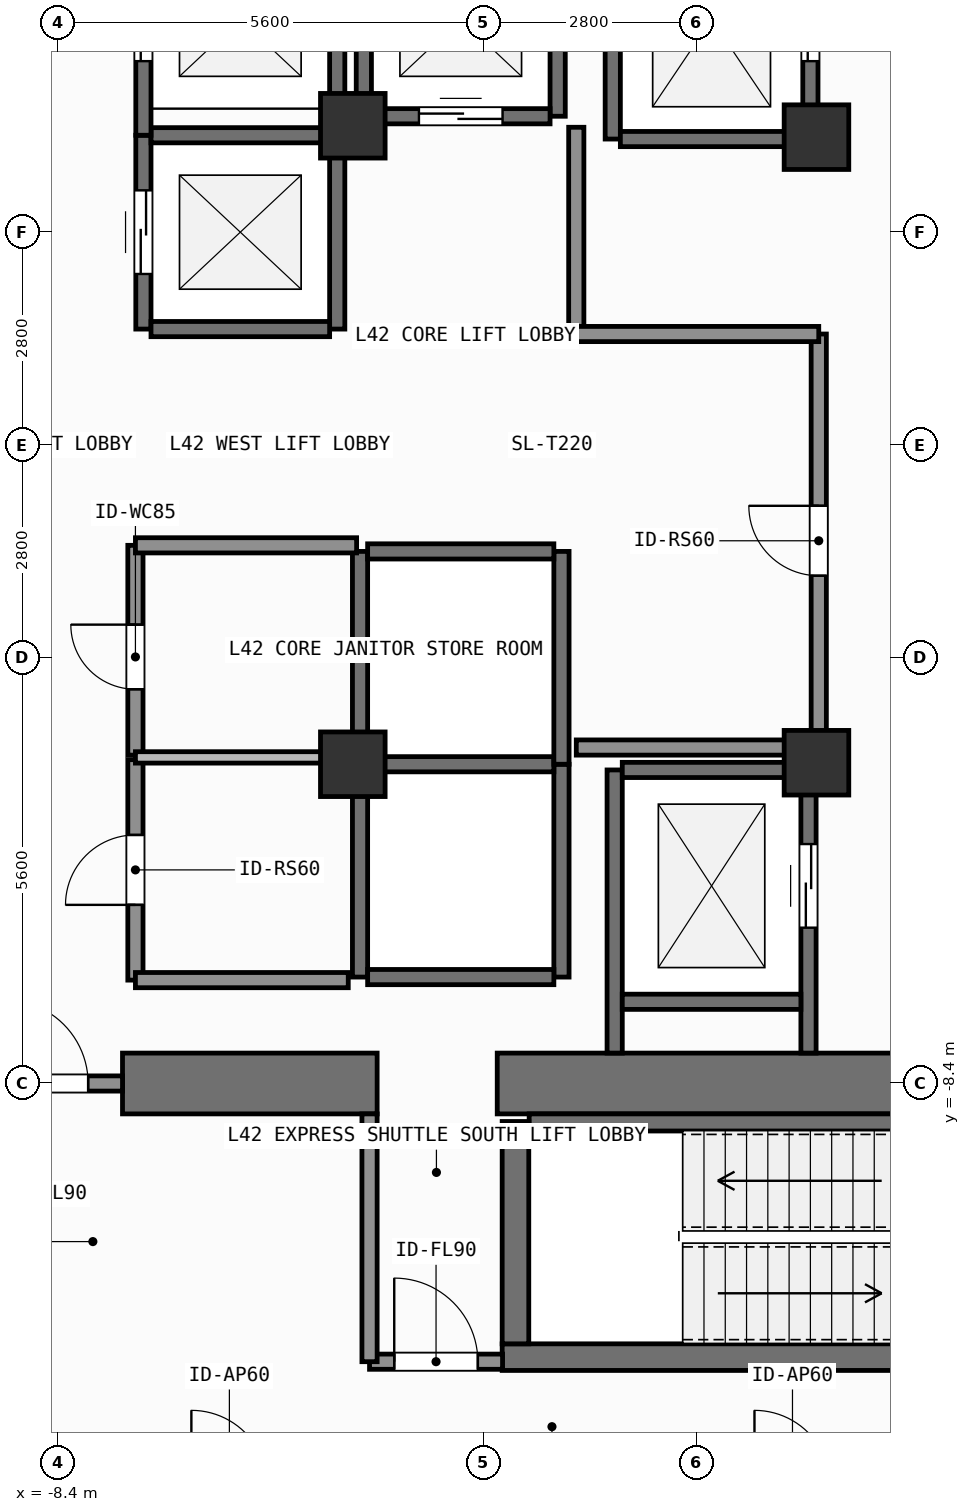
"""IFC4 building model, lengths in metres.
Left out: names, types, materials, properties, quantities, classifications, styles, units other than length and angle.
Written with IfcOpenShell. Run it as: python <this file> out.ifc"""

import sys

from ifc_helpers import new_model, si_unit, direction, frame, frame_2d, origin, origin_2d, place, context, subcontext, project, spatial, rectangle, extrude, element, fill, save


model = new_model("IFC4")
c1 = context("Model", 3, precision=1e-05, world=origin(), true_north=direction((0.0, 1.0)))
c2 = subcontext(c1, "Body", "Model", "MODEL_VIEW")
j1 = project(units=[si_unit("LENGTHUNIT", "METRE"), si_unit("PLANEANGLEUNIT", "RADIAN")], contexts=[c1])
p1 = place(None, origin())
s1 = spatial("IfcSite", under=j1, at=p1, CompositionType="ELEMENT")
p2 = place(p1, origin())
s2 = spatial("IfcBuilding", under=s1, at=p2, CompositionType="ELEMENT")
p3 = place(p2, frame((0.0, 0.0, 171.9)))
s3 = spatial("IfcBuildingStorey", under=s2, at=p3, CompositionType="ELEMENT", Elevation=171.9)
p4 = place(p3, frame((-7.55, -8.4, 0.0), z_axis=(0.0, 0.0, 1.0), x_axis=(1.0, 0.0, 0.0)))
e1 = element("IfcWall", 1, at=p4, inside=s3, PredefinedType="SHEAR", context=c2, shape_type="SweptSolid", body=[
    extrude(rectangle(XDim=3.35, YDim=0.8, at=frame_2d((1.675, 0.0))), origin(), (0.0, 0.0, 1.0), 3.9),
])
p5 = place(p3, frame((-2.62, -8.4, 0.0), z_axis=(0.0, 0.0, 1.0), x_axis=(1.0, 0.0, 0.0)))
e2 = element("IfcWall", 2, at=p5, inside=s3, PredefinedType="SHEAR", context=c2, shape_type="SweptSolid", body=[
    extrude(rectangle(XDim=7.27, YDim=0.8, at=frame_2d((3.635, 0.0))), origin(), (0.0, 0.0, 1.0), 3.9),
])
p6 = place(p3, frame((-2.555, -12.0, 0.0), z_axis=(0.0, 0.0, 1.0), x_axis=(1.0, 0.0, 0.0)))
e3 = element("IfcWall", 3, at=p6, inside=s3, PredefinedType="SHEAR", context=c2, shape_type="SweptSolid", body=[
    extrude(rectangle(XDim=7.31, YDim=0.35, at=frame_2d((3.655, 0.0))), origin(), (0.0, 0.0, 1.0), 3.9),
])
p7 = place(p3, frame((-2.2, -8.913, 0.0), z_axis=(0.0, 0.0, 1.0), x_axis=(1.0, 0.0, 0.0)))
e4 = element("IfcWall", 4, at=p7, inside=s3, PredefinedType="SHEAR", context=c2, shape_type="SweptSolid", body=[
    extrude(rectangle(XDim=6.6, YDim=0.225, at=frame_2d((3.3, 0.0))), origin(), (0.0, 0.0, 1.0), 3.9),
])
p8 = place(p3, frame((-2.38, -11.825, 0.0), z_axis=(0.0, 0.0, 1.0), x_axis=(0.0, 1.0, 0.0)))
e5 = element("IfcWall", 5, at=p8, inside=s3, PredefinedType="SHEAR", context=c2, shape_type="SweptSolid", body=[
    extrude(rectangle(XDim=2.925, YDim=0.35, at=frame_2d((1.462, 0.0))), origin(), (0.0, 0.0, 1.0), 3.9),
])
for number, where, z_axis, x_axis in (
    (6, (-4.52, -4.2, 0.0), (0.0, 0.0, 1.0), (1.0, 0.0, 0.0)),
    (7, (1.58, -4.18, 0.0), (0.0, 0.0, 1.0), (1.0, 0.0, 0.0)),
    (8, (1.58, 4.05, 0.0), (0.0, 0.0, 1.0), (1.0, 0.0, 0.0)),
    (9, (-4.52, 4.2, 0.0), (0.0, 0.0, 1.0), (1.0, 0.0, 0.0)),
):
    element("IfcColumn", number, at=place(p3, frame(where, z_axis=z_axis, x_axis=x_axis)), inside=s3, PredefinedType="COLUMN", context=c2, shape_type="SweptSolid", body=[
        extrude(rectangle(XDim=0.85, YDim=0.85, at=origin_2d()), origin(), (0.0, 0.0, 1.0), 3.9),
    ])
p9 = place(p3, frame((-7.275, 1.525, 0.0), z_axis=(0.0, 0.0, 1.0), x_axis=(0.0, 1.0, 0.0)))
e10 = element("IfcWall", 10, at=p9, inside=s3, PredefinedType="SHEAR", context=c2, shape_type="SweptSolid", body=[
    extrude(rectangle(XDim=2.55, YDim=0.2, at=frame_2d((1.275, 0.0))), origin(), (0.0, 0.0, 1.0), 3.68),
])
p10 = place(p9, frame((0.725, 0.0, 0.0)))
e11 = element("IfcOpeningElement", 11, at=p10, cuts=e10, PredefinedType="OPENING", context=c2, shape_type="SweptSolid", body=[
    extrude(rectangle(XDim=1.1, YDim=2.2, at=frame_2d((0.55, 1.1))), frame((0.0, 0.11, 0.0), z_axis=(0.0, -1.0, 0.0), x_axis=(1.0, 0.0, 0.0)), (0.0, 0.0, 1.0), 0.22),
])
p11 = place(p3, frame((-4.725, 1.525, 0.0), z_axis=(0.0, 0.0, 1.0), x_axis=(0.0, 1.0, 0.0)))
e12 = element("IfcWall", 12, at=p11, inside=s3, PredefinedType="SHEAR", context=c2, shape_type="SweptSolid", body=[
    extrude(rectangle(XDim=2.55, YDim=0.2, at=frame_2d((1.275, 0.0))), origin(), (0.0, 0.0, 1.0), 3.68),
])
for number, where, z_axis, x_axis in (
    (13, (-7.175, 1.525, 0.0), (0.0, 0.0, 1.0), (1.0, 0.0, 0.0)),
    (14, (-7.175, 4.075, 0.0), (0.0, 0.0, 1.0), (1.0, 0.0, 0.0)),
):
    element("IfcWall", number, at=place(p3, frame(where, z_axis=z_axis, x_axis=x_axis)), inside=s3, PredefinedType="SHEAR", context=c2, shape_type="SweptSolid", body=[
        extrude(rectangle(XDim=2.35, YDim=0.2, at=frame_2d((1.175, 0.0))), origin(), (0.0, 0.0, 1.0), 3.68),
    ])
p12 = place(p3, frame((-7.275, 4.075, 0.0), z_axis=(0.0, 0.0, 1.0), x_axis=(0.0, 1.0, 0.0)))
e15 = element("IfcWall", 15, at=p12, inside=s3, PredefinedType="SHEAR", context=c2, shape_type="SweptSolid", body=[
    extrude(rectangle(XDim=2.8, YDim=0.2, at=frame_2d((1.4, 0.0))), origin(), (0.0, 0.0, 1.0), 3.68),
])
p13 = place(p12, frame((0.975, 0.0, 0.0)))
e16 = element("IfcOpeningElement", 16, at=p13, cuts=e15, PredefinedType="OPENING", context=c2, shape_type="SweptSolid", body=[
    extrude(rectangle(XDim=1.1, YDim=2.2, at=frame_2d((0.55, 1.1))), frame((0.0, 0.11, 0.0), z_axis=(0.0, -1.0, 0.0), x_axis=(1.0, 0.0, 0.0)), (0.0, 0.0, 1.0), 0.22),
])
p14 = place(p3, frame((-4.725, 4.075, 0.0), z_axis=(0.0, 0.0, 1.0), x_axis=(0.0, 1.0, 0.0)))
e17 = element("IfcWall", 17, at=p14, inside=s3, PredefinedType="SHEAR", context=c2, shape_type="SweptSolid", body=[
    extrude(rectangle(XDim=2.8, YDim=0.2, at=frame_2d((1.4, 0.0))), origin(), (0.0, 0.0, 1.0), 3.68),
])
for number, where, z_axis, x_axis in (
    (18, (-4.375, 4.325, 0.0), (0.0, 0.0, 1.0), (0.0, 1.0, 0.0)),
    (19, (-1.825, 4.325, 0.0), (0.0, 0.0, 1.0), (0.0, 1.0, 0.0)),
):
    element("IfcWall", number, at=place(p3, frame(where, z_axis=z_axis, x_axis=x_axis)), inside=s3, PredefinedType="SHEAR", context=c2, shape_type="SweptSolid", body=[
        extrude(rectangle(XDim=2.55, YDim=0.2, at=frame_2d((1.275, 0.0))), origin(), (0.0, 0.0, 1.0), 3.68),
    ])
p15 = place(p3, frame((-4.275, 4.325, 0.0), z_axis=(0.0, 0.0, 1.0), x_axis=(1.0, 0.0, 0.0)))
e20 = element("IfcWall", 20, at=p15, inside=s3, PredefinedType="SHEAR", context=c2, shape_type="SweptSolid", body=[
    extrude(rectangle(XDim=2.35, YDim=0.2, at=frame_2d((1.175, 0.0))), origin(), (0.0, 0.0, 1.0), 3.68),
])
p16 = place(p15, frame((0.625, 0.0, 0.0)))
e21 = element("IfcOpeningElement", 21, at=p16, cuts=e20, PredefinedType="OPENING", context=c2, shape_type="SweptSolid", body=[
    extrude(rectangle(XDim=1.1, YDim=2.2, at=frame_2d((0.55, 1.1))), frame((0.0, 0.11, 0.0), z_axis=(0.0, -1.0, 0.0), x_axis=(1.0, 0.0, 0.0)), (0.0, 0.0, 1.0), 0.22),
])
for number, where, z_axis, x_axis in (
    (22, (-4.425, -7.0, 0.0), (0.0, 0.0, 1.0), (0.0, 1.0, 0.0)),
    (23, (-1.775, -7.0, 0.0), (0.0, 0.0, 1.0), (0.0, 1.0, 0.0)),
):
    element("IfcWall", number, at=place(p3, frame(where, z_axis=z_axis, x_axis=x_axis)), inside=s3, PredefinedType="SHEAR", context=c2, shape_type="SweptSolid", body=[
        extrude(rectangle(XDim=2.8, YDim=0.2, at=frame_2d((1.4, 0.0))), origin(), (0.0, 0.0, 1.0), 3.68),
    ])
for number, where, z_axis, x_axis in (
    (24, (-4.325, -7.0, 0.0), (0.0, 0.0, 1.0), (1.0, 0.0, 0.0)),
    (25, (-4.325, -4.2, 0.0), (0.0, 0.0, 1.0), (1.0, 0.0, 0.0)),
):
    element("IfcWall", number, at=place(p3, frame(where, z_axis=z_axis, x_axis=x_axis)), inside=s3, PredefinedType="SHEAR", context=c2, shape_type="SweptSolid", body=[
        extrude(rectangle(XDim=2.45, YDim=0.2, at=frame_2d((1.225, 0.0))), origin(), (0.0, 0.0, 1.0), 3.68),
    ])
for number, where, z_axis, x_axis in (
    (26, (-4.425, -4.2, 0.0), (0.0, 0.0, 1.0), (0.0, 1.0, 0.0)),
    (27, (-1.775, -4.2, 0.0), (0.0, 0.0, 1.0), (0.0, 1.0, 0.0)),
):
    element("IfcWall", number, at=place(p3, frame(where, z_axis=z_axis, x_axis=x_axis)), inside=s3, PredefinedType="SHEAR", context=c2, shape_type="SweptSolid", body=[
        extrude(rectangle(XDim=2.8, YDim=0.2, at=frame_2d((1.4, 0.0))), origin(), (0.0, 0.0, 1.0), 3.68),
    ])
p17 = place(p3, frame((-4.325, -1.4, 0.0), z_axis=(0.0, 0.0, 1.0), x_axis=(1.0, 0.0, 0.0)))
e28 = element("IfcWall", 28, at=p17, inside=s3, PredefinedType="SHEAR", context=c2, shape_type="SweptSolid", body=[
    extrude(rectangle(XDim=2.45, YDim=0.2, at=frame_2d((1.225, 0.0))), origin(), (0.0, 0.0, 1.0), 3.68),
])
p18 = place(p3, frame((-1.1, 4.025, 0.0), z_axis=(0.0, 0.0, 1.0), x_axis=(0.0, 1.0, 0.0)))
e29 = element("IfcWall", 29, at=p18, inside=s3, PredefinedType="SHEAR", context=c2, shape_type="SweptSolid", body=[
    extrude(rectangle(XDim=3.15, YDim=0.2, at=frame_2d((1.575, 0.0))), origin(), (0.0, 0.0, 1.0), 3.68),
])
p19 = place(p3, frame((1.5, 4.025, 0.0), z_axis=(0.0, 0.0, 1.0), x_axis=(0.0, 1.0, 0.0)))
e30 = element("IfcWall", 30, at=p19, inside=s3, PredefinedType="SHEAR", context=c2, shape_type="SweptSolid", body=[
    extrude(rectangle(XDim=3.15, YDim=0.2, at=frame_2d((1.575, 0.0))), origin(), (0.0, 0.0, 1.0), 3.68),
])
p20 = place(p19, frame((1.025, 0.0, 0.0)))
e31 = element("IfcOpeningElement", 31, at=p20, cuts=e30, PredefinedType="OPENING", context=c2, shape_type="SweptSolid", body=[
    extrude(rectangle(XDim=1.1, YDim=2.2, at=frame_2d((0.55, 1.1))), frame((0.0, 0.11, 0.0), z_axis=(0.0, -1.0, 0.0), x_axis=(1.0, 0.0, 0.0)), (0.0, 0.0, 1.0), 0.22),
])
p21 = place(p3, frame((-1.0, 4.025, 0.0), z_axis=(0.0, 0.0, 1.0), x_axis=(1.0, 0.0, 0.0)))
e32 = element("IfcWall", 32, at=p21, inside=s3, PredefinedType="SHEAR", context=c2, shape_type="SweptSolid", body=[
    extrude(rectangle(XDim=2.4, YDim=0.2, at=frame_2d((1.2, 0.0))), origin(), (0.0, 0.0, 1.0), 3.68),
])
p22 = place(p3, frame((-1.075, -8.0, 0.0), z_axis=(0.0, 0.0, 1.0), x_axis=(0.0, 1.0, 0.0)))
e33 = element("IfcWall", 33, at=p22, inside=s3, PredefinedType="SHEAR", context=c2, shape_type="SweptSolid", body=[
    extrude(rectangle(XDim=3.725, YDim=0.2, at=frame_2d((1.863, 0.0))), origin(), (0.0, 0.0, 1.0), 3.68),
])
p23 = place(p3, frame((1.475, -8.0, 0.0), z_axis=(0.0, 0.0, 1.0), x_axis=(0.0, 1.0, 0.0)))
e34 = element("IfcWall", 34, at=p23, inside=s3, PredefinedType="SHEAR", context=c2, shape_type="SweptSolid", body=[
    extrude(rectangle(XDim=3.725, YDim=0.2, at=frame_2d((1.863, 0.0))), origin(), (0.0, 0.0, 1.0), 3.68),
])
p24 = place(p23, frame((1.65, 0.0, 0.0)))
e35 = element("IfcOpeningElement", 35, at=p24, cuts=e34, PredefinedType="OPENING", context=c2, shape_type="SweptSolid", body=[
    extrude(rectangle(XDim=1.1, YDim=2.2, at=frame_2d((0.55, 1.1))), frame((0.0, 0.11, 0.0), z_axis=(0.0, -1.0, 0.0), x_axis=(1.0, 0.0, 0.0)), (0.0, 0.0, 1.0), 0.22),
])
for number, where, z_axis, x_axis in (
    (36, (-0.975, -7.325, 0.0), (0.0, 0.0, 1.0), (1.0, 0.0, 0.0)),
    (37, (-0.975, -4.275, 0.0), (0.0, 0.0, 1.0), (1.0, 0.0, 0.0)),
):
    element("IfcWall", number, at=place(p3, frame(where, z_axis=z_axis, x_axis=x_axis)), inside=s3, PredefinedType="SHEAR", context=c2, shape_type="SweptSolid", body=[
        extrude(rectangle(XDim=2.35, YDim=0.2, at=frame_2d((1.175, 0.0))), origin(), (0.0, 0.0, 1.0), 3.68),
    ])
p25 = place(p3, frame((-9.7, -8.4, 0.0), z_axis=(0.0, 0.0, 1.0), x_axis=(1.0, 0.0, 0.0)))
e38 = element("IfcWall", 38, at=p25, inside=s3, PredefinedType="SOLIDWALL", context=c2, shape_type="SweptSolid", body=[
    extrude(rectangle(XDim=2.15, YDim=0.2, at=frame_2d((1.075, 0.0))), origin(), (0.0, 0.0, 1.0), 2.82),
])
p26 = place(p25, frame((0.598, 0.0, 0.0)))
e39 = element("IfcOpeningElement", 39, at=p26, cuts=e38, PredefinedType="OPENING", context=c2, shape_type="SweptSolid", body=[
    extrude(rectangle(XDim=1.1, YDim=2.15, at=frame_2d((0.55, 1.075))), frame((0.0, 0.11, 0.0), z_axis=(0.0, -1.0, 0.0), x_axis=(1.0, 0.0, 0.0)), (0.0, 0.0, 1.0), 0.22),
])
p27 = place(p3, frame((-4.3, -12.06, 0.0), z_axis=(0.0, 0.0, 1.0), x_axis=(1.0, 0.0, 0.0)))
e40 = element("IfcWall", 40, at=p27, inside=s3, PredefinedType="SOLIDWALL", context=c2, shape_type="SweptSolid", body=[
    extrude(rectangle(XDim=1.75, YDim=0.2, at=frame_2d((0.875, 0.0))), origin(), (0.0, 0.0, 1.0), 3.68),
])
p28 = place(p27, frame((0.325, 0.0, 0.0)))
e41 = element("IfcOpeningElement", 41, at=p28, cuts=e40, PredefinedType="OPENING", context=c2, shape_type="SweptSolid", body=[
    extrude(rectangle(XDim=1.1, YDim=2.15, at=frame_2d((0.55, 1.075))), frame((0.0, 0.11, 0.0), z_axis=(0.0, -1.0, 0.0), x_axis=(1.0, 0.0, 0.0)), (0.0, 0.0, 1.0), 0.22),
])
p29 = place(p3, frame((1.61, -3.98, 0.0), z_axis=(0.0, 0.0, 1.0), x_axis=(0.0, 1.0, 0.0)))
e42 = element("IfcWall", 42, at=p29, inside=s3, PredefinedType="SOLIDWALL", context=c2, shape_type="SweptSolid", body=[
    extrude(rectangle(XDim=5.44, YDim=0.2, at=frame_2d((2.72, 0.0))), origin(), (0.0, 0.0, 1.0), 3.68),
])
p30 = place(p29, frame((2.26, 0.0, 0.0)))
e43 = element("IfcOpeningElement", 43, at=p30, cuts=e42, PredefinedType="OPENING", context=c2, shape_type="SweptSolid", body=[
    extrude(rectangle(XDim=0.92, YDim=2.1, at=frame_2d((0.46, 1.05))), frame((0.0, 0.11, 0.0), z_axis=(0.0, -1.0, 0.0), x_axis=(1.0, 0.0, 0.0)), (0.0, 0.0, 1.0), 0.22),
])
p31 = place(p3, frame((-7.38, -7.04, 0.0), z_axis=(0.0, 0.0, 1.0), x_axis=(0.0, 1.0, 0.0)))
e44 = element("IfcWall", 44, at=p31, inside=s3, PredefinedType="SOLIDWALL", context=c2, shape_type="SweptSolid", body=[
    extrude(rectangle(XDim=2.9, YDim=0.2, at=frame_2d((1.45, 0.0))), origin(), (0.0, 0.0, 1.0), 3.68),
])
p32 = place(p31, frame((0.99, 0.0, 0.0)))
e45 = element("IfcOpeningElement", 45, at=p32, cuts=e44, PredefinedType="OPENING", context=c2, shape_type="SweptSolid", body=[
    extrude(rectangle(XDim=0.92, YDim=2.1, at=frame_2d((0.46, 1.05))), frame((0.0, 0.11, 0.0), z_axis=(0.0, -1.0, 0.0), x_axis=(1.0, 0.0, 0.0)), (0.0, 0.0, 1.0), 0.22),
])
p33 = place(p3, frame((-7.38, -4.08, 0.0), z_axis=(0.0, 0.0, 1.0), x_axis=(0.0, 1.0, 0.0)))
e46 = element("IfcWall", 46, at=p33, inside=s3, PredefinedType="SOLIDWALL", context=c2, shape_type="SweptSolid", body=[
    extrude(rectangle(XDim=2.76, YDim=0.2, at=frame_2d((1.38, 0.0))), origin(), (0.0, 0.0, 1.0), 3.68),
])
p34 = place(p33, frame((0.867, 0.0, 0.0)))
e47 = element("IfcOpeningElement", 47, at=p34, cuts=e46, PredefinedType="OPENING", context=c2, shape_type="SweptSolid", body=[
    extrude(rectangle(XDim=0.85, YDim=2.1, at=frame_2d((0.425, 1.05))), frame((0.0, 0.11, 0.0), z_axis=(0.0, -1.0, 0.0), x_axis=(1.0, 0.0, 0.0)), (0.0, 0.0, 1.0), 0.22),
])
p35 = place(p3, frame((-4.3, -12.06, 0.0), z_axis=(0.0, 0.0, 1.0), x_axis=(0.0, 1.0, 0.0)))
e48 = element("IfcWall", 48, at=p35, inside=s3, PredefinedType="SOLIDWALL", context=c2, shape_type="SweptSolid", body=[
    extrude(rectangle(XDim=3.26, YDim=0.2, at=frame_2d((1.63, 0.0))), origin(), (0.0, 0.0, 1.0), 3.68),
])
p36 = place(p3, frame((-7.38, -1.32, 0.0), z_axis=(0.0, 0.0, 1.0), x_axis=(1.0, 0.0, 0.0)))
e49 = element("IfcWall", 49, at=p36, inside=s3, PredefinedType="SOLIDWALL", context=c2, shape_type="SweptSolid", body=[
    extrude(rectangle(XDim=2.91, YDim=0.2, at=frame_2d((1.455, 0.0))), origin(), (0.0, 0.0, 1.0), 3.68),
])
p37 = place(p3, frame((-1.58, 1.48, 0.0), z_axis=(0.0, 0.0, 1.0), x_axis=(0.0, 1.0, 0.0)))
e50 = element("IfcWall", 50, at=p37, inside=s3, PredefinedType="SOLIDWALL", context=c2, shape_type="SweptSolid", body=[
    extrude(rectangle(XDim=2.7, YDim=0.2, at=frame_2d((1.35, 0.0))), origin(), (0.0, 0.0, 1.0), 3.68),
])
for number, where, z_axis, x_axis in (
    (51, (-1.58, -3.98, 0.0), (0.0, 0.0, 1.0), (1.0, 0.0, 0.0)),
    (52, (-1.58, 1.46, 0.0), (0.0, 0.0, 1.0), (1.0, 0.0, 0.0)),
):
    element("IfcWall", number, at=place(p3, frame(where, z_axis=z_axis, x_axis=x_axis)), inside=s3, PredefinedType="SOLIDWALL", context=c2, shape_type="SweptSolid", body=[
        extrude(rectangle(XDim=3.19, YDim=0.2, at=frame_2d((1.595, 0.0))), origin(), (0.0, 0.0, 1.0), 3.68),
    ])
p38 = place(p3, frame((-7.38, -7.04, 0.0), z_axis=(0.0, 0.0, 1.0), x_axis=(1.0, 0.0, 0.0)))
e53 = element("IfcWall", 53, at=p38, inside=s3, PredefinedType="SOLIDWALL", context=c2, shape_type="SweptSolid", body=[
    extrude(rectangle(XDim=2.8, YDim=0.2, at=frame_2d((1.4, 0.0))), origin(), (0.0, 0.0, 1.0), 3.68),
])
p39 = place(p3, frame((-7.38, -4.11, 0.0), z_axis=(0.0, 0.0, 1.0), x_axis=(1.0, 0.0, 0.0)))
e54 = element("IfcWall", 54, at=p39, inside=s3, PredefinedType="PARTITIONING", context=c2, shape_type="SweptSolid", body=[
    extrude(rectangle(XDim=2.8, YDim=0.15, at=frame_2d((1.4, 0.0))), origin(), (0.0, 0.0, 1.0), 3.68),
])
p40 = place(p10, origin())
e55 = element("IfcDoor", 55, at=p40, inside=s3, OperationType="SLIDING_TO_LEFT", PredefinedType="DOOR", context=c2, shape_type="SweptSolid", body=[
    extrude(rectangle(XDim=1.1, YDim=2.2, at=frame_2d((0.55, 1.1))), frame((0.0, 0.025, 0.0), z_axis=(0.0, -1.0, 0.0), x_axis=(1.0, 0.0, 0.0)), (0.0, 0.0, 1.0), 0.05),
])
fill(e11, e55)
p41 = place(p13, origin())
e56 = element("IfcDoor", 56, at=p41, inside=s3, OperationType="SLIDING_TO_LEFT", PredefinedType="DOOR", context=c2, shape_type="SweptSolid", body=[
    extrude(rectangle(XDim=1.1, YDim=2.2, at=frame_2d((0.55, 1.1))), frame((0.0, 0.025, 0.0), z_axis=(0.0, -1.0, 0.0), x_axis=(1.0, 0.0, 0.0)), (0.0, 0.0, 1.0), 0.05),
])
fill(e16, e56)
p42 = place(p16, origin())
e57 = element("IfcDoor", 57, at=p42, inside=s3, OperationType="SLIDING_TO_LEFT", PredefinedType="DOOR", context=c2, shape_type="SweptSolid", body=[
    extrude(rectangle(XDim=1.1, YDim=2.2, at=frame_2d((0.55, 1.1))), frame((0.0, 0.025, 0.0), z_axis=(0.0, -1.0, 0.0), x_axis=(1.0, 0.0, 0.0)), (0.0, 0.0, 1.0), 0.05),
])
fill(e21, e57)
p43 = place(p20, origin())
e58 = element("IfcDoor", 58, at=p43, inside=s3, OperationType="SLIDING_TO_LEFT", PredefinedType="DOOR", context=c2, shape_type="SweptSolid", body=[
    extrude(rectangle(XDim=1.1, YDim=2.2, at=frame_2d((0.55, 1.1))), frame((0.0, 0.025, 0.0), z_axis=(0.0, -1.0, 0.0), x_axis=(1.0, 0.0, 0.0)), (0.0, 0.0, 1.0), 0.05),
])
fill(e31, e58)
p44 = place(p24, origin())
e59 = element("IfcDoor", 59, at=p44, inside=s3, OperationType="SLIDING_TO_LEFT", PredefinedType="DOOR", context=c2, shape_type="SweptSolid", body=[
    extrude(rectangle(XDim=1.1, YDim=2.2, at=frame_2d((0.55, 1.1))), frame((0.0, 0.025, 0.0), z_axis=(0.0, -1.0, 0.0), x_axis=(1.0, 0.0, 0.0)), (0.0, 0.0, 1.0), 0.05),
])
fill(e35, e59)
p45 = place(p26, origin())
e60 = element("IfcDoor", 60, at=p45, inside=s3, OperationType="SINGLE_SWING_LEFT", PredefinedType="DOOR", context=c2, shape_type="SweptSolid", body=[
    extrude(rectangle(XDim=1.1, YDim=2.15, at=frame_2d((0.55, 1.075))), frame((0.0, 0.025, 0.0), z_axis=(0.0, -1.0, 0.0), x_axis=(1.0, 0.0, 0.0)), (0.0, 0.0, 1.0), 0.05),
])
fill(e39, e60)
p46 = place(p28, origin())
e61 = element("IfcDoor", 61, at=p46, inside=s3, OperationType="SINGLE_SWING_LEFT", PredefinedType="DOOR", context=c2, shape_type="SweptSolid", body=[
    extrude(rectangle(XDim=1.1, YDim=2.15, at=frame_2d((0.55, 1.075))), frame((0.0, 0.025, 0.0), z_axis=(0.0, -1.0, 0.0), x_axis=(1.0, 0.0, 0.0)), (0.0, 0.0, 1.0), 0.05),
])
fill(e41, e61)
p47 = place(p30, origin())
e62 = element("IfcDoor", 62, at=p47, inside=s3, OperationType="SINGLE_SWING_RIGHT", PredefinedType="DOOR", context=c2, shape_type="SweptSolid", body=[
    extrude(rectangle(XDim=0.92, YDim=2.1, at=frame_2d((0.46, 1.05))), frame((0.0, 0.025, 0.0), z_axis=(0.0, -1.0, 0.0), x_axis=(1.0, 0.0, 0.0)), (0.0, 0.0, 1.0), 0.05),
])
fill(e43, e62)
p48 = place(p32, origin())
e63 = element("IfcDoor", 63, at=p48, inside=s3, OperationType="SINGLE_SWING_LEFT", PredefinedType="DOOR", context=c2, shape_type="SweptSolid", body=[
    extrude(rectangle(XDim=0.92, YDim=2.1, at=frame_2d((0.46, 1.05))), frame((0.0, 0.025, 0.0), z_axis=(0.0, -1.0, 0.0), x_axis=(1.0, 0.0, 0.0)), (0.0, 0.0, 1.0), 0.05),
])
fill(e45, e63)
p49 = place(p34, origin())
e64 = element("IfcDoor", 64, at=p49, inside=s3, OperationType="SINGLE_SWING_RIGHT", PredefinedType="DOOR", context=c2, shape_type="SweptSolid", body=[
    extrude(rectangle(XDim=0.85, YDim=2.1, at=frame_2d((0.425, 1.05))), frame((0.0, 0.025, 0.0), z_axis=(0.0, -1.0, 0.0), x_axis=(1.0, 0.0, 0.0)), (0.0, 0.0, 1.0), 0.05),
])
fill(e47, e64)
save(model, sys.argv[1])
